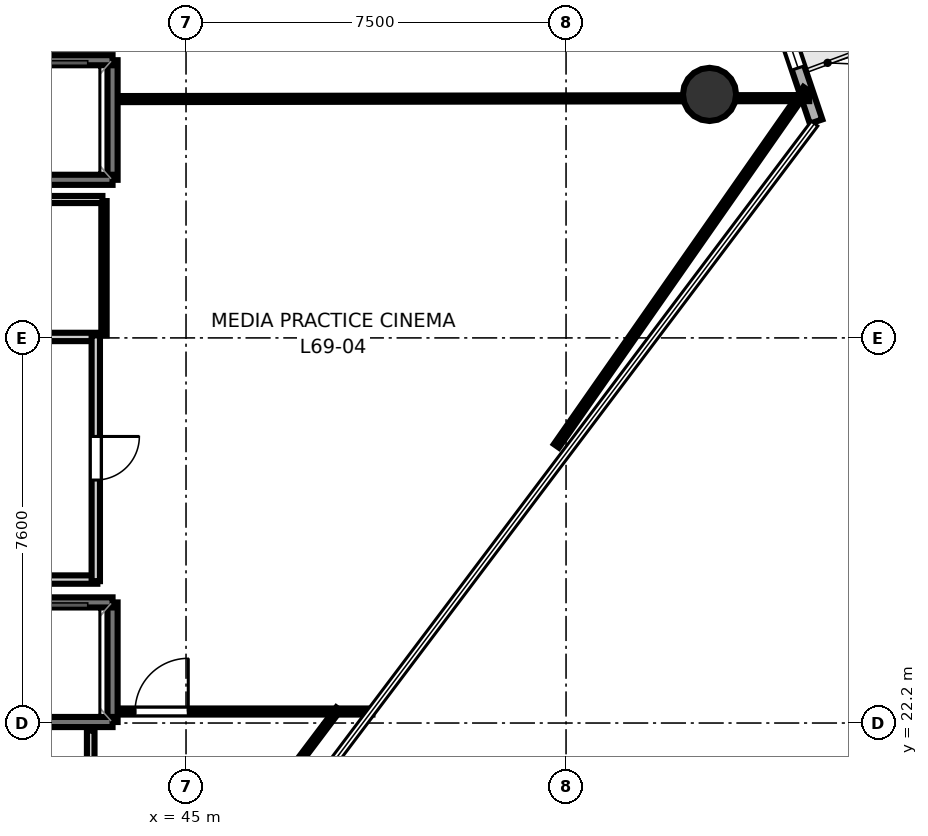
"""IFC4 building model, lengths in metres.
Left out: names, types, materials, properties, quantities, classifications, styles, units other than length and angle.
Written with IfcOpenShell. Run it as: python <this file> out.ifc"""

import sys

from ifc_helpers import new_model, si_unit, direction, frame, frame_2d, origin, origin_2d, place, context, subcontext, project, spatial, rectangle, hollow_circle, extrude, element, fill, save


model = new_model("IFC4")
c1 = context("Model", 3, precision=1e-05, world=origin(), true_north=direction((0.0, 1.0)))
c2 = subcontext(c1, "Body", "Model", "MODEL_VIEW")
j1 = project(units=[si_unit("LENGTHUNIT", "METRE"), si_unit("PLANEANGLEUNIT", "RADIAN")], contexts=[c1])
p1 = place(None, origin())
s1 = spatial("IfcSite", under=j1, at=p1, CompositionType="ELEMENT")
p2 = place(p1, origin())
s2 = spatial("IfcBuilding", under=s1, at=p2, CompositionType="ELEMENT")
p3 = place(p2, frame((0.0, 0.0, 268.6)))
s3 = spatial("IfcBuildingStorey", under=s2, at=p3, CompositionType="ELEMENT", Elevation=268.6)
p4 = place(p3, frame((55.332, 34.605, 0.0), z_axis=(0.0, 0.0, 1.0), x_axis=(1.0, 0.0, 0.0)))
e1 = element("IfcColumn", 1, at=p4, inside=s3, PredefinedType="COLUMN", context=c2, shape_type="SweptSolid", body=[
    extrude(hollow_circle(Radius=0.525, WallThickness=0.028, at=origin_2d()), origin(), (0.0, 0.0, 1.0), 3.7),
])
p5 = place(p3, frame((57.435, 34.07, 0.0), z_axis=(0.0, 0.0, 1.0), x_axis=(-0.319235252436, 0.947675500159, 0.0)))
e2 = element("IfcWall", 2, at=p5, inside=s3, PredefinedType="SOLIDWALL", context=c2, shape_type="SweptSolid", body=[
    extrude(rectangle(XDim=4.649, YDim=0.26, at=frame_2d((2.324, 0.0))), origin(), (0.0, 0.0, 1.0), 3.52),
])
p6 = place(p5, frame((1.115, 0.0, 0.9)))
e3 = element("IfcOpeningElement", 3, at=p6, cuts=e2, PredefinedType="OPENING", context=c2, shape_type="SweptSolid", body=[
    extrude(rectangle(XDim=1.2, YDim=2.0, at=frame_2d((0.6, 1.0))), frame((0.0, 0.14, 0.0), z_axis=(0.0, -1.0, 0.0), x_axis=(1.0, 0.0, 0.0)), (0.0, 0.0, 1.0), 0.28),
])
p7 = place(p3, frame((43.55, 22.22, 0.0), z_axis=(0.0, 0.0, 1.0), x_axis=(0.0, 1.0, 0.0)))
e4 = element("IfcWall", 4, at=p7, inside=s3, PredefinedType="SOLIDWALL", context=c2, shape_type="SweptSolid", body=[
    extrude(rectangle(XDim=2.36, YDim=0.2, at=frame_2d((1.18, 0.0))), origin(), (0.0, 0.0, 1.0), 3.52),
])
for number, where, z_axis, x_axis in (
    (5, (41.45, 24.58, 0.0), (0.0, 0.0, 1.0), (1.0, 0.0, 0.0)),
    (6, (41.45, 22.22, 0.0), (0.0, 0.0, 1.0), (1.0, 0.0, 0.0)),
):
    element("IfcWall", number, at=place(p3, frame(where, z_axis=z_axis, x_axis=x_axis)), inside=s3, PredefinedType="SOLIDWALL", context=c2, shape_type="SweptSolid", body=[
        extrude(rectangle(XDim=2.1, YDim=0.2, at=frame_2d((1.05, 0.0))), origin(), (0.0, 0.0, 1.0), 3.52),
    ])
p8 = place(p3, frame((43.55, 32.92, 0.0), z_axis=(0.0, 0.0, 1.0), x_axis=(0.0, 1.0, 0.0)))
e7 = element("IfcWall", 7, at=p8, inside=s3, PredefinedType="SOLIDWALL", context=c2, shape_type="SweptSolid", body=[
    extrude(rectangle(XDim=2.36, YDim=0.2, at=frame_2d((1.18, 0.0))), origin(), (0.0, 0.0, 1.0), 3.52),
])
for number, where, z_axis, x_axis in (
    (8, (41.45, 35.28, 0.0), (0.0, 0.0, 1.0), (1.0, 0.0, 0.0)),
    (9, (41.45, 32.92, 0.0), (0.0, 0.0, 1.0), (1.0, 0.0, 0.0)),
):
    element("IfcWall", number, at=place(p3, frame(where, z_axis=z_axis, x_axis=x_axis)), inside=s3, PredefinedType="SOLIDWALL", context=c2, shape_type="SweptSolid", body=[
        extrude(rectangle(XDim=2.1, YDim=0.2, at=frame_2d((1.05, 0.0))), origin(), (0.0, 0.0, 1.0), 3.52),
    ])
p9 = place(p3, frame((43.119, 22.05, 0.0), z_axis=(0.0, 0.0, 1.0), x_axis=(0.0, -1.0, 0.0)))
e10 = element("IfcWall", 10, at=p9, inside=s3, PredefinedType="PARTITIONING", context=c2, shape_type="SweptSolid", body=[
    extrude(rectangle(XDim=3.97, YDim=0.15, at=frame_2d((1.985, 0.0))), origin(), (0.0, 0.0, 1.0), 2.84),
])
p10 = place(p9, frame((0.94, 0.0, 0.0)))
e11 = element("IfcOpeningElement", 11, at=p10, cuts=e10, PredefinedType="OPENING", context=c2, shape_type="SweptSolid", body=[
    extrude(rectangle(XDim=1.25, YDim=2.2, at=frame_2d((0.625, 1.1))), frame((0.0, 0.085, 0.0), z_axis=(0.0, -1.0, 0.0), x_axis=(1.0, 0.0, 0.0)), (0.0, 0.0, 1.0), 0.17),
])
for number, where, z_axis, x_axis in (
    (12, (43.25, 25.031, 0.0), (0.0, 0.0, 1.0), (-1.0, 0.0, 0.0)),
    (13, (41.58, 29.819, 0.0), (0.0, 0.0, 1.0), (1.0, 0.0, 0.0)),
):
    element("IfcWall", number, at=place(p3, frame(where, z_axis=z_axis, x_axis=x_axis)), inside=s3, PredefinedType="PLUMBINGWALL", context=c2, shape_type="SweptSolid", body=[
        extrude(rectangle(XDim=1.67, YDim=0.165, at=frame_2d((0.835, 0.0))), origin(), (0.0, 0.0, 1.0), 2.84),
    ])
p11 = place(p3, frame((43.219, 29.85, 0.0), z_axis=(0.0, 0.0, 1.0), x_axis=(0.0, -1.0, 0.0)))
e14 = element("IfcWall", 14, at=p11, inside=s3, PredefinedType="PLUMBINGWALL", context=c2, shape_type="SweptSolid", body=[
    extrude(rectangle(XDim=4.85, YDim=0.165, at=frame_2d((2.425, 0.0))), origin(), (0.0, 0.0, 1.0), 2.84),
])
p12 = place(p11, frame((1.995, 0.0, 0.0)))
e15 = element("IfcOpeningElement", 15, at=p12, cuts=e14, PredefinedType="OPENING", context=c2, shape_type="SweptSolid", body=[
    extrude(rectangle(XDim=0.86, YDim=2.05, at=frame_2d((0.43, 1.025))), frame((0.0, 0.093, 0.0), z_axis=(0.0, -1.0, 0.0), x_axis=(1.0, 0.0, 0.0)), (0.0, 0.0, 1.0), 0.185),
])
p13 = place(p3, frame((43.72, 22.427, 0.0), z_axis=(0.0, 0.0, 1.0), x_axis=(1.0, 0.0, 0.0)))
e16 = element("IfcWall", 16, at=p13, inside=s3, PredefinedType="PARTITIONING", context=c2, shape_type="SweptSolid", body=[
    extrude(rectangle(XDim=4.959, YDim=0.12, at=frame_2d((2.479, 0.0))), origin(), (0.0, 0.0, 1.0), 2.84),
])
p14 = place(p13, frame((0.274, 0.0, 0.0)))
e17 = element("IfcOpeningElement", 17, at=p14, cuts=e16, PredefinedType="OPENING", context=c2, shape_type="SweptSolid", body=[
    extrude(rectangle(XDim=1.05, YDim=2.15, at=frame_2d((0.525, 1.075))), frame((0.0, 0.07, 0.0), z_axis=(0.0, -1.0, 0.0), x_axis=(1.0, 0.0, 0.0)), (0.0, 0.0, 1.0), 0.14),
])
p15 = place(p3, frame((48.006, 22.477, 0.0), z_axis=(0.0, 0.0, 1.0), x_axis=(-0.601888401824, -0.798580209966, 0.0)))
e18 = element("IfcWall", 18, at=p15, inside=s3, PredefinedType="PARTITIONING", context=c2, shape_type="SweptSolid", body=[
    extrude(rectangle(XDim=2.129, YDim=0.105, at=frame_2d((1.064, 0.0))), origin(), (0.0, 0.0, 1.0), 2.84),
])
p16 = place(p3, frame((57.299, 34.532, 0.0), z_axis=(0.0, 0.0, 1.0), x_axis=(-0.999998965603, -0.001438330048, 0.0)))
e19 = element("IfcWall", 19, at=p16, inside=s3, PredefinedType="PARTITIONING", context=c2, shape_type="SweptSolid", body=[
    extrude(rectangle(XDim=13.579, YDim=0.12, at=frame_2d((6.79, 0.0))), origin(), (0.0, 0.0, 1.0), 2.84),
])
p17 = place(p3, frame((43.381, 29.85, 0.0), z_axis=(0.0, 0.0, 1.0), x_axis=(0.0, 1.0, 0.0)))
e20 = element("IfcWall", 20, at=p17, inside=s3, PredefinedType="PARTITIONING", context=c2, shape_type="SweptSolid", body=[
    extrude(rectangle(XDim=2.65, YDim=0.105, at=frame_2d((1.325, 0.0))), origin(), (0.0, 0.0, 1.0), 2.84),
])
p18 = place(p3, frame((43.35, 32.531, 0.0), z_axis=(0.0, 0.0, 1.0), x_axis=(-1.0, 0.0, 0.0)))
e21 = element("IfcWall", 21, at=p18, inside=s3, PredefinedType="PARTITIONING", context=c2, shape_type="SweptSolid", body=[
    extrude(rectangle(XDim=1.808, YDim=0.14, at=frame_2d((0.904, 0.0))), origin(), (0.0, 0.0, 1.0), 2.84),
])
p19 = place(p3, frame((57.234, 34.719, 0.0), z_axis=(0.0, 0.0, 1.0), x_axis=(-0.572627410691, -0.819815740594, 0.0)))
e22 = element("IfcWall", 22, at=p19, inside=s3, PredefinedType="PARTITIONING", context=c2, shape_type="SweptSolid", body=[
    extrude(rectangle(XDim=8.599, YDim=0.12, at=frame_2d((4.299, 0.0))), origin(), (0.0, 0.0, 1.0), 2.84),
])
p20 = place(p14, origin())
e23 = element("IfcDoor", 23, at=p20, inside=s3, OperationType="SINGLE_SWING_RIGHT", PredefinedType="DOOR", context=c2, shape_type="SweptSolid", body=[
    extrude(rectangle(XDim=1.05, YDim=2.15, at=frame_2d((0.525, 1.075))), frame((0.0, 0.025, 0.0), z_axis=(0.0, -1.0, 0.0), x_axis=(1.0, 0.0, 0.0)), (0.0, 0.0, 1.0), 0.05),
])
fill(e17, e23)
p21 = place(p12, origin())
e24 = element("IfcDoor", 24, at=p21, inside=s3, OperationType="SINGLE_SWING_LEFT", PredefinedType="DOOR", context=c2, shape_type="SweptSolid", body=[
    extrude(rectangle(XDim=0.86, YDim=2.05, at=frame_2d((0.43, 1.025))), frame((0.0, 0.025, 0.0), z_axis=(0.0, -1.0, 0.0), x_axis=(1.0, 0.0, 0.0)), (0.0, 0.0, 1.0), 0.05),
])
fill(e15, e24)
p22 = place(p6, origin())
e25 = element("IfcWindow", 25, at=p22, inside=s3, PartitioningType="SINGLE_PANEL", PredefinedType="WINDOW", context=c2, shape_type="SweptSolid", body=[
    extrude(rectangle(XDim=1.2, YDim=2.0, at=frame_2d((0.6, 1.0))), frame((0.0, 0.03, 0.0), z_axis=(0.0, -1.0, 0.0), x_axis=(1.0, 0.0, 0.0)), (0.0, 0.0, 1.0), 0.06),
])
fill(e3, e25)
save(model, sys.argv[1])
